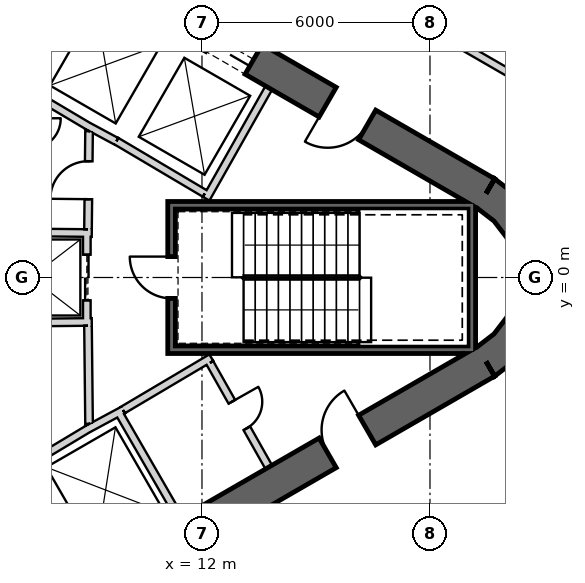
"""IFC4 building model, lengths in metres.
Left out: names, types, materials, properties, quantities, classifications, styles, units other than length and angle.
Written with IfcOpenShell. Run it as: python <this file> out.ifc"""

import sys

from ifc_helpers import new_model, si_unit, direction, frame, frame_2d, origin, place, context, subcontext, project, spatial, polyline, rectangle, outline, extrude, element, fill, save


model = new_model("IFC4")
c1 = context("Model", 3, precision=1e-05, world=origin(), true_north=direction((0.0, 1.0)))
c2 = subcontext(c1, "Body", "Model", "MODEL_VIEW")
j1 = project(units=[si_unit("LENGTHUNIT", "METRE"), si_unit("PLANEANGLEUNIT", "RADIAN")], contexts=[c1])
p1 = place(None, origin())
s1 = spatial("IfcSite", under=j1, at=p1, CompositionType="ELEMENT")
p2 = place(p1, origin())
s2 = spatial("IfcBuilding", under=s1, at=p2, CompositionType="ELEMENT")
p3 = place(p2, frame((0.0, 0.0, 143.9)))
s3 = spatial("IfcBuildingStorey", under=s2, at=p3, CompositionType="ELEMENT", Elevation=143.9)
p4 = place(p3, frame((19.475, 2.208, 0.0), z_axis=(0.0, 0.0, 1.0), x_axis=(-0.866028369851, 0.499994862586, 0.0)))
e1 = element("IfcWall", 1, at=p4, inside=s3, PredefinedType="SHEAR", context=c2, shape_type="SweptSolid", body=[
    extrude(rectangle(XDim=31.523, YDim=0.9, at=frame_2d((15.762, 0.0))), origin(), (0.0, 0.0, 1.0), 4.1),
])
p5 = place(p4, frame((7.062, 0.0, 0.0)))
e2 = element("IfcOpeningElement", 2, at=p5, cuts=e1, PredefinedType="OPENING", context=c2, shape_type="SweptSolid", body=[
    extrude(rectangle(XDim=1.2, YDim=2.4, at=frame_2d((0.6, 1.2))), frame((0.0, 0.46, 0.0), z_axis=(0.0, -1.0, 0.0), x_axis=(1.0, 0.0, 0.0)), (0.0, 0.0, 1.0), 0.92),
])
p6 = place(p4, frame((9.762, 0.0, 0.0)))
e3 = element("IfcOpeningElement", 3, at=p6, cuts=e1, PredefinedType="OPENING", context=c2, shape_type="SweptSolid", body=[
    extrude(rectangle(XDim=1.2, YDim=2.4, at=frame_2d((0.6, 1.2))), frame((0.0, 0.46, 0.0), z_axis=(0.0, -1.0, 0.0), x_axis=(1.0, 0.0, 0.0)), (0.0, 0.0, 1.0), 0.92),
])
p7 = place(p4, frame((12.462, 0.0, 0.0)))
e4 = element("IfcOpeningElement", 4, at=p7, cuts=e1, PredefinedType="OPENING", context=c2, shape_type="SweptSolid", body=[
    extrude(rectangle(XDim=1.2, YDim=2.4, at=frame_2d((0.6, 1.2))), frame((0.0, 0.46, 0.0), z_axis=(0.0, -1.0, 0.0), x_axis=(1.0, 0.0, 0.0)), (0.0, 0.0, 1.0), 0.92),
])
p8 = place(p4, frame((15.162, 0.0, 0.0)))
e5 = element("IfcOpeningElement", 5, at=p8, cuts=e1, PredefinedType="OPENING", context=c2, shape_type="SweptSolid", body=[
    extrude(rectangle(XDim=1.2, YDim=2.4, at=frame_2d((0.6, 1.2))), frame((0.0, 0.46, 0.0), z_axis=(0.0, -1.0, 0.0), x_axis=(1.0, 0.0, 0.0)), (0.0, 0.0, 1.0), 0.92),
])
p9 = place(p4, frame((17.862, 0.0, 0.0)))
e6 = element("IfcOpeningElement", 6, at=p9, cuts=e1, PredefinedType="OPENING", context=c2, shape_type="SweptSolid", body=[
    extrude(rectangle(XDim=1.2, YDim=2.4, at=frame_2d((0.6, 1.2))), frame((0.0, 0.46, 0.0), z_axis=(0.0, -1.0, 0.0), x_axis=(1.0, 0.0, 0.0)), (0.0, 0.0, 1.0), 0.92),
])
p10 = place(p4, frame((20.562, 0.0, 0.0)))
e7 = element("IfcOpeningElement", 7, at=p10, cuts=e1, PredefinedType="OPENING", context=c2, shape_type="SweptSolid", body=[
    extrude(rectangle(XDim=1.2, YDim=2.4, at=frame_2d((0.6, 1.2))), frame((0.0, 0.46, 0.0), z_axis=(0.0, -1.0, 0.0), x_axis=(1.0, 0.0, 0.0)), (0.0, 0.0, 1.0), 0.92),
])
p11 = place(p4, frame((23.262, 0.0, 0.0)))
e8 = element("IfcOpeningElement", 8, at=p11, cuts=e1, PredefinedType="OPENING", context=c2, shape_type="SweptSolid", body=[
    extrude(rectangle(XDim=1.2, YDim=2.4, at=frame_2d((0.6, 1.2))), frame((0.0, 0.46, 0.0), z_axis=(0.0, -1.0, 0.0), x_axis=(1.0, 0.0, 0.0)), (0.0, 0.0, 1.0), 0.92),
])
p12 = place(p4, frame((3.612, 0.0, 0.0)))
e9 = element("IfcOpeningElement", 9, at=p12, cuts=e1, PredefinedType="OPENING", context=c2, shape_type="SweptSolid", body=[
    extrude(rectangle(XDim=1.2, YDim=2.4, at=frame_2d((0.6, 1.2))), frame((0.0, 0.46, 0.0), z_axis=(0.0, -1.0, 0.0), x_axis=(1.0, 0.0, 0.0)), (0.0, 0.0, 1.0), 0.92),
])
p13 = place(p4, frame((26.712, 0.0, 0.0)))
e10 = element("IfcOpeningElement", 10, at=p13, cuts=e1, PredefinedType="OPENING", context=c2, shape_type="SweptSolid", body=[
    extrude(rectangle(XDim=1.2, YDim=2.4, at=frame_2d((0.6, 1.2))), frame((0.0, 0.46, 0.0), z_axis=(0.0, -1.0, 0.0), x_axis=(1.0, 0.0, 0.0)), (0.0, 0.0, 1.0), 0.92),
])
p14 = place(p3, frame((-7.825, -17.97, 0.0), z_axis=(0.0, 0.0, 1.0), x_axis=(0.866028369851, 0.499994862586, 0.0)))
e11 = element("IfcWall", 11, at=p14, inside=s3, PredefinedType="SHEAR", context=c2, shape_type="SweptSolid", body=[
    extrude(rectangle(XDim=31.523, YDim=0.9, at=frame_2d((15.762, 0.0))), origin(), (0.0, 0.0, 1.0), 4.1),
])
p15 = place(p14, frame((7.062, 0.0, 0.0)))
e12 = element("IfcOpeningElement", 12, at=p15, cuts=e11, PredefinedType="OPENING", context=c2, shape_type="SweptSolid", body=[
    extrude(rectangle(XDim=1.2, YDim=2.4, at=frame_2d((0.6, 1.2))), frame((0.0, 0.46, 0.0), z_axis=(0.0, -1.0, 0.0), x_axis=(1.0, 0.0, 0.0)), (0.0, 0.0, 1.0), 0.92),
])
p16 = place(p14, frame((9.762, 0.0, 0.0)))
e13 = element("IfcOpeningElement", 13, at=p16, cuts=e11, PredefinedType="OPENING", context=c2, shape_type="SweptSolid", body=[
    extrude(rectangle(XDim=1.2, YDim=2.4, at=frame_2d((0.6, 1.2))), frame((0.0, 0.46, 0.0), z_axis=(0.0, -1.0, 0.0), x_axis=(1.0, 0.0, 0.0)), (0.0, 0.0, 1.0), 0.92),
])
p17 = place(p14, frame((12.462, 0.0, 0.0)))
e14 = element("IfcOpeningElement", 14, at=p17, cuts=e11, PredefinedType="OPENING", context=c2, shape_type="SweptSolid", body=[
    extrude(rectangle(XDim=1.2, YDim=2.4, at=frame_2d((0.6, 1.2))), frame((0.0, 0.46, 0.0), z_axis=(0.0, -1.0, 0.0), x_axis=(1.0, 0.0, 0.0)), (0.0, 0.0, 1.0), 0.92),
])
p18 = place(p14, frame((15.162, 0.0, 0.0)))
e15 = element("IfcOpeningElement", 15, at=p18, cuts=e11, PredefinedType="OPENING", context=c2, shape_type="SweptSolid", body=[
    extrude(rectangle(XDim=1.2, YDim=2.4, at=frame_2d((0.6, 1.2))), frame((0.0, 0.46, 0.0), z_axis=(0.0, -1.0, 0.0), x_axis=(1.0, 0.0, 0.0)), (0.0, 0.0, 1.0), 0.92),
])
p19 = place(p14, frame((17.862, 0.0, 0.0)))
e16 = element("IfcOpeningElement", 16, at=p19, cuts=e11, PredefinedType="OPENING", context=c2, shape_type="SweptSolid", body=[
    extrude(rectangle(XDim=1.2, YDim=2.4, at=frame_2d((0.6, 1.2))), frame((0.0, 0.46, 0.0), z_axis=(0.0, -1.0, 0.0), x_axis=(1.0, 0.0, 0.0)), (0.0, 0.0, 1.0), 0.92),
])
p20 = place(p14, frame((20.562, 0.0, 0.0)))
e17 = element("IfcOpeningElement", 17, at=p20, cuts=e11, PredefinedType="OPENING", context=c2, shape_type="SweptSolid", body=[
    extrude(rectangle(XDim=1.2, YDim=2.4, at=frame_2d((0.6, 1.2))), frame((0.0, 0.46, 0.0), z_axis=(0.0, -1.0, 0.0), x_axis=(1.0, 0.0, 0.0)), (0.0, 0.0, 1.0), 0.92),
])
p21 = place(p14, frame((26.712, 0.0, 0.0)))
e18 = element("IfcOpeningElement", 18, at=p21, cuts=e11, PredefinedType="OPENING", context=c2, shape_type="SweptSolid", body=[
    extrude(rectangle(XDim=1.2, YDim=2.4, at=frame_2d((0.6, 1.2))), frame((0.0, 0.46, 0.0), z_axis=(0.0, -1.0, 0.0), x_axis=(1.0, 0.0, 0.0)), (0.0, 0.0, 1.0), 0.92),
])
p22 = place(p14, frame((3.612, 0.0, 0.0)))
e19 = element("IfcOpeningElement", 19, at=p22, cuts=e11, PredefinedType="OPENING", context=c2, shape_type="SweptSolid", body=[
    extrude(rectangle(XDim=1.2, YDim=2.4, at=frame_2d((0.6, 1.2))), frame((0.0, 0.46, 0.0), z_axis=(0.0, -1.0, 0.0), x_axis=(1.0, 0.0, 0.0)), (0.0, 0.0, 1.0), 0.92),
])
p23 = place(p3, origin())
e20 = element("IfcWall", 20, at=p23, inside=s3, PredefinedType="SHEAR", context=c2, shape_type="SweptSolid", body=[
    extrude(outline(polyline([(19.7, -2.598), (20.321, -2.121), (20.798, -1.5), (21.098, -0.777), (21.2, 0.0), (21.098, 0.777), (20.798, 1.5), (20.321, 2.121), (19.7, 2.598), (19.25, 1.819), (19.685, 1.485), (20.019, 1.05), (20.229, 0.543), (20.3, 0.0), (20.229, -0.543), (20.019, -1.05), (19.685, -1.485), (19.25, -1.819), (19.7, -2.598)])), origin(), (0.0, 0.0, 1.0), 4.1),
])
p24 = place(p3, frame((12.11, 2.073, 0.0), z_axis=(0.0, 0.0, 1.0), x_axis=(0.49196600604, 0.870614408852, 0.0)))
e21 = element("IfcWall", 21, at=p24, inside=s3, PredefinedType="PLUMBINGWALL", context=c2, shape_type="SweptSolid", body=[
    extrude(rectangle(XDim=3.35, YDim=0.2, at=frame_2d((1.675, 0.0))), origin(), (0.0, 0.0, 1.0), 3.8),
])
p25 = place(p3, frame((12.073, 2.211, 0.0), z_axis=(0.0, 0.0, 1.0), x_axis=(-0.860438357912, 0.509554542943, 0.0)))
e22 = element("IfcWall", 22, at=p25, inside=s3, PredefinedType="PLUMBINGWALL", context=c2, shape_type="SweptSolid", body=[
    extrude(rectangle(XDim=2.7, YDim=0.2, at=frame_2d((1.35, 0.0))), origin(), (0.0, 0.0, 1.0), 3.8),
])
p26 = place(p3, frame((9.748, 3.583, 0.0), z_axis=(0.0, 0.0, 1.0), x_axis=(-0.880917147855, 0.473270513147, 0.0)))
e23 = element("IfcWall", 23, at=p26, inside=s3, PredefinedType="PLUMBINGWALL", context=c2, shape_type="SweptSolid", body=[
    extrude(rectangle(XDim=0.878, YDim=0.2, at=frame_2d((0.439, 0.0))), origin(), (0.0, 0.0, 1.0), 3.8),
])
p27 = place(p3, frame((9.08, 3.937, 0.0), z_axis=(0.0, 0.0, 1.0), x_axis=(-0.859981807212, 0.510324691999, 0.0)))
e24 = element("IfcWall", 24, at=p27, inside=s3, PredefinedType="PLUMBINGWALL", context=c2, shape_type="SweptSolid", body=[
    extrude(rectangle(XDim=1.845, YDim=0.2, at=frame_2d((0.922, 0.0))), origin(), (0.0, 0.0, 1.0), 3.8),
])
p28 = place(p3, frame((9.795, -3.525, 0.0), z_axis=(0.0, 0.0, 1.0), x_axis=(0.499984717929, -0.866034226713, 0.0)))
e25 = element("IfcWall", 25, at=p28, inside=s3, PredefinedType="PLUMBINGWALL", context=c2, shape_type="SweptSolid", body=[
    extrude(rectangle(XDim=3.25, YDim=0.2, at=frame_2d((1.625, 0.0))), origin(), (0.0, 0.0, 1.0), 3.8),
])
p29 = place(p3, frame((8.974, -3.999, 0.0), z_axis=(0.0, 0.0, 1.0), x_axis=(0.880907015104, 0.473289373154, 0.0)))
e26 = element("IfcWall", 26, at=p29, inside=s3, PredefinedType="PLUMBINGWALL", context=c2, shape_type="SweptSolid", body=[
    extrude(rectangle(XDim=1.078, YDim=0.2, at=frame_2d((0.539, 0.0))), origin(), (0.0, 0.0, 1.0), 3.8),
])
p30 = place(p3, frame((7.497, -4.886, 0.0), z_axis=(0.0, 0.0, 1.0), x_axis=(0.857516281273, 0.51445682749, 0.0)))
e27 = element("IfcWall", 27, at=p30, inside=s3, PredefinedType="PLUMBINGWALL", context=c2, shape_type="SweptSolid", body=[
    extrude(rectangle(XDim=1.845, YDim=0.2, at=frame_2d((0.922, 0.0))), origin(), (0.0, 0.0, 1.0), 3.8),
])
p31 = place(p3, frame((19.2, 1.9, -0.3), z_axis=(0.0, 0.0, 1.0), x_axis=(-1.0, 0.0, 0.0)))
e28 = element("IfcWall", 28, at=p31, inside=s3, PredefinedType="SHEAR", context=c2, shape_type="SweptSolid", body=[
    extrude(rectangle(XDim=8.1, YDim=0.2, at=frame_2d((4.05, 0.0))), origin(), (0.0, 0.0, 1.0), 4.1),
])
p32 = place(p3, frame((19.1, -2.0, -0.3), z_axis=(0.0, 0.0, 1.0), x_axis=(0.0, 1.0, 0.0)))
e29 = element("IfcWall", 29, at=p32, inside=s3, PredefinedType="SHEAR", context=c2, shape_type="SweptSolid", body=[
    extrude(rectangle(XDim=3.8, YDim=0.2, at=frame_2d((1.9, 0.0))), origin(), (0.0, 0.0, 1.0), 4.1),
])
p33 = place(p3, frame((11.1, -1.9, -0.3), z_axis=(0.0, 0.0, 1.0), x_axis=(1.0, 0.0, 0.0)))
e30 = element("IfcWall", 30, at=p33, inside=s3, PredefinedType="SHEAR", context=c2, shape_type="SweptSolid", body=[
    extrude(rectangle(XDim=7.9, YDim=0.2, at=frame_2d((3.95, 0.0))), origin(), (0.0, 0.0, 1.0), 4.1),
])
p34 = place(p3, frame((11.2, -1.8, -0.3), z_axis=(0.0, 0.0, 1.0), x_axis=(0.0, 1.0, 0.0)))
e31 = element("IfcWall", 31, at=p34, inside=s3, PredefinedType="SHEAR", context=c2, shape_type="SweptSolid", body=[
    extrude(rectangle(XDim=3.6, YDim=0.2, at=frame_2d((1.8, 0.0))), origin(), (0.0, 0.0, 1.0), 4.1),
])
p35 = place(p34, frame((1.25, 0.0, 0.3)))
e32 = element("IfcOpeningElement", 32, at=p35, cuts=e31, PredefinedType="OPENING", context=c2, shape_type="SweptSolid", body=[
    extrude(rectangle(XDim=1.1, YDim=2.1, at=frame_2d((0.55, 1.05))), frame((0.0, 0.11, 0.0), z_axis=(0.0, -1.0, 0.0), x_axis=(1.0, 0.0, 0.0)), (0.0, 0.0, 1.0), 0.22),
])
p36 = place(p3, frame((8.97, 1.2, 0.0), z_axis=(0.0, 0.0, 1.0), x_axis=(0.0, -1.0, 0.0)))
e33 = element("IfcWall", 33, at=p36, inside=s3, PredefinedType="PLUMBINGWALL", context=c2, shape_type="SweptSolid", body=[
    extrude(rectangle(XDim=2.4, YDim=0.2, at=frame_2d((1.2, 0.0))), origin(), (0.0, 0.0, 1.0), 3.8),
])
p37 = place(p36, frame((0.6, 0.0, 0.0)))
e34 = element("IfcOpeningElement", 34, at=p37, cuts=e33, PredefinedType="OPENING", context=c2, shape_type="SweptSolid", body=[
    extrude(rectangle(XDim=1.2, YDim=2.4, at=frame_2d((0.6, 1.2))), frame((0.0, 0.11, 0.0), z_axis=(0.0, -1.0, 0.0), x_axis=(1.0, 0.0, 0.0)), (0.0, 0.0, 1.0), 0.22),
])
p38 = place(p3, frame((9.1, -1.169, 0.0), z_axis=(0.0, 0.0, 1.0), x_axis=(-0.999949988, -0.010001074852, 0.0)))
e35 = element("IfcWall", 35, at=p38, inside=s3, PredefinedType="PLUMBINGWALL", context=c2, shape_type="SweptSolid", body=[
    extrude(rectangle(XDim=3.1, YDim=0.2, at=frame_2d((1.55, 0.0))), origin(), (0.0, 0.0, 1.0), 3.8),
])
p39 = place(p3, frame((9.1, 1.169, 0.0), z_axis=(0.0, 0.0, 1.0), x_axis=(-0.99994990606, 0.010009264196, 0.0)))
e36 = element("IfcWall", 36, at=p39, inside=s3, PredefinedType="PLUMBINGWALL", context=c2, shape_type="SweptSolid", body=[
    extrude(rectangle(XDim=3.0, YDim=0.2, at=frame_2d((1.5, 0.0))), origin(), (0.0, 0.0, 1.0), 3.8),
])
p40 = place(p3, frame((12.245, -2.109, 0.0), z_axis=(0.0, 0.0, 1.0), x_axis=(-0.860414880418, -0.509594185166, 0.0)))
e37 = element("IfcWall", 37, at=p40, inside=s3, PredefinedType="PARTITIONING", context=c2, shape_type="SweptSolid", body=[
    extrude(rectangle(XDim=2.7, YDim=0.2, at=frame_2d((1.35, 0.0))), origin(), (0.0, 0.0, 1.0), 3.8),
])
p41 = place(p3, frame((13.758, -4.99, 0.0), z_axis=(0.0, 0.0, 1.0), x_axis=(-0.491993409184, 0.87059892334, 0.0)))
e38 = element("IfcWall", 38, at=p41, inside=s3, PredefinedType="PARTITIONING", context=c2, shape_type="SweptSolid", body=[
    extrude(rectangle(XDim=3.15, YDim=0.2, at=frame_2d((1.575, 0.0))), origin(), (0.0, 0.0, 1.0), 3.8),
])
p42 = place(p41, frame((1.175, 0.0, 0.0)))
e39 = element("IfcOpeningElement", 39, at=p42, cuts=e38, PredefinedType="OPENING", context=c2, shape_type="SweptSolid", body=[
    extrude(rectangle(XDim=0.8, YDim=2.1, at=frame_2d((0.4, 1.05))), frame((0.0, 0.11, 0.0), z_axis=(0.0, -1.0, 0.0), x_axis=(1.0, 0.0, 0.0)), (0.0, 0.0, 1.0), 0.22),
])
p43 = place(p3, frame((9.029, -3.851, 0.0), z_axis=(0.0, 0.0, 1.0), x_axis=(-0.010784614026, 0.999941844359, 0.0)))
e40 = element("IfcWall", 40, at=p43, inside=s3, PredefinedType="PARTITIONING", context=c2, shape_type="SweptSolid", body=[
    extrude(rectangle(XDim=2.581, YDim=0.2, at=frame_2d((1.291, 0.0))), origin(), (0.0, 0.0, 1.0), 3.8),
])
p44 = place(p3, frame((9.001, 1.27, 0.0), z_axis=(0.0, 0.0, 1.0), x_axis=(0.010783593937, 0.99994185536, 0.0)))
e41 = element("IfcWall", 41, at=p44, inside=s3, PredefinedType="PARTITIONING", context=c2, shape_type="SweptSolid", body=[
    extrude(rectangle(XDim=2.581, YDim=0.2, at=frame_2d((1.291, 0.0))), origin(), (0.0, 0.0, 1.0), 3.8),
])
p45 = place(p44, frame((0.791, 0.0, 0.0)))
e42 = element("IfcOpeningElement", 42, at=p45, cuts=e41, PredefinedType="OPENING", context=c2, shape_type="SweptSolid", body=[
    extrude(rectangle(XDim=1.0, YDim=2.1, at=frame_2d((0.5, 1.05))), frame((0.0, 0.11, 0.0), z_axis=(0.0, -1.0, 0.0), x_axis=(1.0, 0.0, 0.0)), (0.0, 0.0, 1.0), 0.22),
])
p46 = place(p3, frame((21.552, 4.531, 0.0), z_axis=(0.0, 0.0, 1.0), x_axis=(-0.866023703603, 0.500002944789, 0.0)))
e43 = element("IfcWall", 43, at=p46, inside=s3, PredefinedType="PARTITIONING", context=c2, shape_type="SweptSolid", body=[
    extrude(rectangle(XDim=32.599, YDim=0.2, at=frame_2d((16.299, 0.0))), origin(), (0.0, 0.0, 1.0), 2.98),
])
p47 = place(p46, frame((15.85, 0.0, 0.0)))
e44 = element("IfcOpeningElement", 44, at=p47, cuts=e43, PredefinedType="OPENING", context=c2, shape_type="SweptSolid", body=[
    extrude(rectangle(XDim=1.0, YDim=2.1, at=frame_2d((0.5, 1.05))), frame((0.0, 0.11, 0.0), z_axis=(0.0, -1.0, 0.0), x_axis=(1.0, 0.0, 0.0)), (0.0, 0.0, 1.0), 0.22),
])
p48 = place(p3, frame((-1.123, -18.315, 0.0), z_axis=(0.0, 0.0, 1.0), x_axis=(0.866026561282, 0.49999799515, 0.0)))
e45 = element("IfcWall", 45, at=p48, inside=s3, PredefinedType="PARTITIONING", context=c2, shape_type="SweptSolid", body=[
    extrude(rectangle(XDim=26.435, YDim=0.2, at=frame_2d((13.218, 0.0))), origin(), (0.0, 0.0, 1.0), 2.98),
])
p49 = place(p48, frame((12.718, 0.0, 0.0)))
e46 = element("IfcOpeningElement", 46, at=p49, cuts=e45, PredefinedType="OPENING", context=c2, shape_type="SweptSolid", body=[
    extrude(rectangle(XDim=1.0, YDim=2.1, at=frame_2d((0.5, 1.05))), frame((0.0, 0.11, 0.0), z_axis=(0.0, -1.0, 0.0), x_axis=(1.0, 0.0, 0.0)), (0.0, 0.0, 1.0), 0.22),
])
p50 = place(p35, origin())
e47 = element("IfcDoor", 47, at=p50, inside=s3, OperationType="SINGLE_SWING_RIGHT", PredefinedType="USERDEFINED", context=c2, shape_type="SweptSolid", body=[
    extrude(rectangle(XDim=1.1, YDim=2.1, at=frame_2d((0.55, 1.05))), frame((0.0, 0.025, 0.0), z_axis=(0.0, -1.0, 0.0), x_axis=(1.0, 0.0, 0.0)), (0.0, 0.0, 1.0), 0.05),
])
fill(e32, e47)
p51 = place(p45, origin())
e48 = element("IfcDoor", 48, at=p51, inside=s3, OperationType="SINGLE_SWING_RIGHT", PredefinedType="USERDEFINED", context=c2, shape_type="SweptSolid", body=[
    extrude(rectangle(XDim=1.0, YDim=2.1, at=frame_2d((0.5, 1.05))), frame((0.0, 0.025, 0.0), z_axis=(0.0, -1.0, 0.0), x_axis=(1.0, 0.0, 0.0)), (0.0, 0.0, 1.0), 0.05),
])
fill(e42, e48)
p52 = place(p37, origin())
e49 = element("IfcDoor", 49, at=p52, inside=s3, OperationType="SLIDING_TO_LEFT", PredefinedType="USERDEFINED", context=c2, shape_type="SweptSolid", body=[
    extrude(rectangle(XDim=1.2, YDim=2.4, at=frame_2d((0.6, 1.2))), frame((0.0, 0.025, 0.0), z_axis=(0.0, -1.0, 0.0), x_axis=(1.0, 0.0, 0.0)), (0.0, 0.0, 1.0), 0.05),
])
fill(e34, e49)
p53 = place(p42, origin())
e50 = element("IfcDoor", 50, at=p53, inside=s3, OperationType="SINGLE_SWING_RIGHT", PredefinedType="USERDEFINED", context=c2, shape_type="SweptSolid", body=[
    extrude(rectangle(XDim=0.8, YDim=2.1, at=frame_2d((0.4, 1.05))), frame((0.0, 0.025, 0.0), z_axis=(0.0, -1.0, 0.0), x_axis=(1.0, 0.0, 0.0)), (0.0, 0.0, 1.0), 0.05),
])
fill(e39, e50)
p54 = place(p5, origin())
e51 = element("IfcDoor", 51, at=p54, inside=s3, OperationType="SLIDING_TO_LEFT", PredefinedType="USERDEFINED", context=c2, shape_type="SweptSolid", body=[
    extrude(rectangle(XDim=1.2, YDim=2.4, at=frame_2d((0.6, 1.2))), frame((0.0, 0.025, 0.0), z_axis=(0.0, -1.0, 0.0), x_axis=(1.0, 0.0, 0.0)), (0.0, 0.0, 1.0), 0.05),
])
fill(e2, e51)
p55 = place(p21, origin())
e52 = element("IfcDoor", 52, at=p55, inside=s3, OperationType="SINGLE_SWING_RIGHT", PredefinedType="USERDEFINED", context=c2, shape_type="SweptSolid", body=[
    extrude(rectangle(XDim=1.2, YDim=2.4, at=frame_2d((0.6, 1.2))), frame((0.0, 0.025, 0.0), z_axis=(0.0, -1.0, 0.0), x_axis=(1.0, 0.0, 0.0)), (0.0, 0.0, 1.0), 0.05),
])
fill(e18, e52)
p56 = place(p12, origin())
e53 = element("IfcDoor", 53, at=p56, inside=s3, OperationType="SINGLE_SWING_RIGHT", PredefinedType="USERDEFINED", context=c2, shape_type="SweptSolid", body=[
    extrude(rectangle(XDim=1.2, YDim=2.4, at=frame_2d((0.6, 1.2))), frame((0.0, 0.025, 0.0), z_axis=(0.0, -1.0, 0.0), x_axis=(1.0, 0.0, 0.0)), (0.0, 0.0, 1.0), 0.05),
])
fill(e9, e53)
save(model, sys.argv[1])
